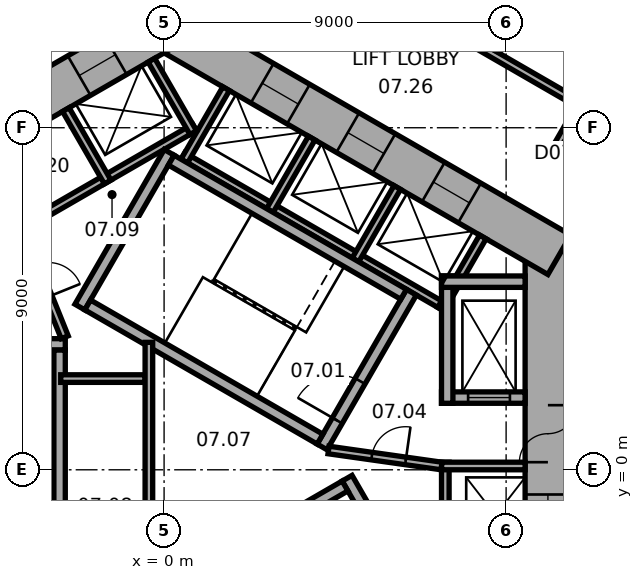
"""IFC4 building model, lengths in metres.
Left out: names, types, materials, properties, quantities, classifications, styles, units other than length and angle.
Written with IfcOpenShell. Run it as: python <this file> out.ifc"""

import sys

from ifc_helpers import new_model, si_unit, direction, frame, frame_2d, origin, place, context, subcontext, project, spatial, rectangle, extrude, element, fill, save


model = new_model("IFC4")
c1 = context("Model", 3, precision=1e-05, world=origin(), true_north=direction((0.0, 1.0)))
c2 = subcontext(c1, "Body", "Model", "MODEL_VIEW")
j1 = project(units=[si_unit("LENGTHUNIT", "METRE"), si_unit("PLANEANGLEUNIT", "RADIAN")], contexts=[c1])
p1 = place(None, origin())
s1 = spatial("IfcSite", under=j1, at=p1, CompositionType="ELEMENT")
p2 = place(p1, origin())
s2 = spatial("IfcBuilding", under=s1, at=p2, CompositionType="ELEMENT")
p3 = place(p2, frame((0.0, 0.0, 44.0)))
s3 = spatial("IfcBuildingStorey", under=s2, at=p3, CompositionType="ELEMENT", Elevation=44.0)
p4 = place(p3, frame((10.1, -6.177, 0.0), z_axis=(0.0, 0.0, 1.0), x_axis=(0.0, 1.0, 0.0)))
e1 = element("IfcWall", 1, at=p4, inside=s3, PredefinedType="SHEAR", context=c2, shape_type="SweptSolid", body=[
    extrude(rectangle(XDim=12.355, YDim=1.2, at=frame_2d((6.177, 0.0))), origin(), (0.0, 0.0, 1.0), 3.3),
])
p5 = place(p4, frame((6.378, 0.0, 0.0)))
e2 = element("IfcOpeningElement", 2, at=p5, cuts=e1, PredefinedType="OPENING", context=c2, shape_type="SweptSolid", body=[
    extrude(rectangle(XDim=1.5, YDim=2.1, at=frame_2d((0.75, 1.05))), frame((0.0, 0.61, 0.0), z_axis=(0.0, -1.0, 0.0), x_axis=(1.0, 0.0, 0.0)), (0.0, 0.0, 1.0), 1.22),
])
p6 = place(p4, frame((1.828, 0.0, 0.0)))
e3 = element("IfcOpeningElement", 3, at=p6, cuts=e1, PredefinedType="OPENING", context=c2, shape_type="SweptSolid", body=[
    extrude(rectangle(XDim=1.1, YDim=2.1, at=frame_2d((0.55, 1.05))), frame((0.0, 0.61, 0.0), z_axis=(0.0, -1.0, 0.0), x_axis=(1.0, 0.0, 0.0)), (0.0, 0.0, 1.0), 1.22),
])
p7 = place(p4, frame((4.427, 0.0, 0.0)))
e4 = element("IfcOpeningElement", 4, at=p7, cuts=e1, PredefinedType="OPENING", context=c2, shape_type="SweptSolid", body=[
    extrude(rectangle(XDim=1.1, YDim=2.1, at=frame_2d((0.55, 1.05))), frame((0.0, 0.61, 0.0), z_axis=(0.0, -1.0, 0.0), x_axis=(1.0, 0.0, 0.0)), (0.0, 0.0, 1.0), 1.22),
])
p8 = place(p3, frame((10.4, 5.658, 0.0), z_axis=(0.0, 0.0, 1.0), x_axis=(-0.866021384402, 0.500006961711, 0.0)))
e5 = element("IfcWall", 5, at=p8, inside=s3, PredefinedType="SHEAR", context=c2, shape_type="SweptSolid", body=[
    extrude(rectangle(XDim=12.355, YDim=1.2, at=frame_2d((6.178, 0.0))), origin(), (0.0, 0.0, 1.0), 3.3),
])
p9 = place(p8, frame((2.728, 0.0, 0.0)))
e6 = element("IfcOpeningElement", 6, at=p9, cuts=e5, PredefinedType="OPENING", context=c2, shape_type="SweptSolid", body=[
    extrude(rectangle(XDim=1.1, YDim=2.1, at=frame_2d((0.55, 1.05))), frame((0.0, 0.61, 0.0), z_axis=(0.0, -1.0, 0.0), x_axis=(1.0, 0.0, 0.0)), (0.0, 0.0, 1.0), 1.22),
])
p10 = place(p8, frame((5.328, 0.0, 0.0)))
e7 = element("IfcOpeningElement", 7, at=p10, cuts=e5, PredefinedType="OPENING", context=c2, shape_type="SweptSolid", body=[
    extrude(rectangle(XDim=1.1, YDim=2.1, at=frame_2d((0.55, 1.05))), frame((0.0, 0.61, 0.0), z_axis=(0.0, -1.0, 0.0), x_axis=(1.0, 0.0, 0.0)), (0.0, 0.0, 1.0), 1.22),
])
p11 = place(p8, frame((7.928, 0.0, 0.0)))
e8 = element("IfcOpeningElement", 8, at=p11, cuts=e5, PredefinedType="OPENING", context=c2, shape_type="SweptSolid", body=[
    extrude(rectangle(XDim=1.1, YDim=2.1, at=frame_2d((0.55, 1.05))), frame((0.0, 0.61, 0.0), z_axis=(0.0, -1.0, 0.0), x_axis=(1.0, 0.0, 0.0)), (0.0, 0.0, 1.0), 1.22),
])
p12 = place(p3, frame((0.3, 11.836, 0.0), z_axis=(0.0, 0.0, 1.0), x_axis=(-0.866021384402, -0.500006961711, 0.0)))
e9 = element("IfcWall", 9, at=p12, inside=s3, PredefinedType="SHEAR", context=c2, shape_type="SweptSolid", body=[
    extrude(rectangle(XDim=12.355, YDim=1.2, at=frame_2d((6.178, 0.0))), origin(), (0.0, 0.0, 1.0), 3.3),
])
p13 = place(p12, frame((6.378, 0.0, 0.0)))
e10 = element("IfcOpeningElement", 10, at=p13, cuts=e9, PredefinedType="OPENING", context=c2, shape_type="SweptSolid", body=[
    extrude(rectangle(XDim=1.5, YDim=2.1, at=frame_2d((0.75, 1.05))), frame((0.0, 0.61, 0.0), z_axis=(0.0, -1.0, 0.0), x_axis=(1.0, 0.0, 0.0)), (0.0, 0.0, 1.0), 1.22),
])
p14 = place(p12, frame((1.828, 0.0, 0.0)))
e11 = element("IfcOpeningElement", 11, at=p14, cuts=e9, PredefinedType="OPENING", context=c2, shape_type="SweptSolid", body=[
    extrude(rectangle(XDim=1.1, YDim=2.1, at=frame_2d((0.55, 1.05))), frame((0.0, 0.61, 0.0), z_axis=(0.0, -1.0, 0.0), x_axis=(1.0, 0.0, 0.0)), (0.0, 0.0, 1.0), 1.22),
])
p15 = place(p3, frame((7.4, -5.2, 0.0), z_axis=(0.0, 0.0, 1.0), x_axis=(0.0, 1.0, 0.0)))
e12 = element("IfcWall", 12, at=p15, inside=s3, PredefinedType="PARTITIONING", context=c2, shape_type="SweptSolid", body=[
    extrude(rectangle(XDim=5.4, YDim=0.2, at=frame_2d((2.7, 0.0))), origin(), (0.0, 0.0, 1.0), 3.05),
])
p16 = place(p3, frame((7.3, 0.1, 0.0), z_axis=(0.0, 0.0, 1.0), x_axis=(1.0, 0.0, 0.0)))
e13 = element("IfcWall", 13, at=p16, inside=s3, PredefinedType="PARTITIONING", context=c2, shape_type="SweptSolid", body=[
    extrude(rectangle(XDim=2.2, YDim=0.2, at=frame_2d((1.1, 0.0))), origin(), (0.0, 0.0, 1.0), 3.05),
])
p17 = place(p3, frame((7.424, 4.259, 0.0), z_axis=(0.0, 0.0, 1.0), x_axis=(-0.866026010844, 0.49999894854, 0.0)))
e14 = element("IfcWall", 14, at=p17, inside=s3, PredefinedType="PARTITIONING", context=c2, shape_type="SweptSolid", body=[
    extrude(rectangle(XDim=8.0, YDim=0.2, at=frame_2d((4.0, 0.0))), origin(), (0.0, 0.0, 1.0), 3.05),
])
for number, where, z_axis, x_axis in (
    (15, (7.287, 4.222, 0.0), (0.0, 0.0, 1.0), (0.5, 0.866, 0.0)),
    (16, (5.036, 5.522, 0.0), (0.0, 0.0, 1.0), (0.5, 0.866, 0.0)),
    (17, (2.784, 6.822, 0.0), (0.0, 0.0, 1.0), (0.5, 0.866, 0.0)),
    (18, (0.532, 8.122, 0.0), (0.0, 0.0, 1.0), (0.5, 0.866, 0.0)),
):
    element("IfcWall", number, at=place(p3, frame(where, z_axis=z_axis, x_axis=x_axis)), inside=s3, PredefinedType="PARTITIONING", context=c2, shape_type="SweptSolid", body=[
        extrude(rectangle(XDim=2.2, YDim=0.2, at=frame_2d((1.1, 0.0))), origin(), (0.0, 0.0, 1.0), 3.05),
    ])
p18 = place(p3, frame((0.803, 9.009, 0.0), z_axis=(0.0, 0.0, 1.0), x_axis=(-0.866028230842, -0.499995103361, 0.0)))
e19 = element("IfcWall", 19, at=p18, inside=s3, PredefinedType="PARTITIONING", context=c2, shape_type="SweptSolid", body=[
    extrude(rectangle(XDim=5.4, YDim=0.2, at=frame_2d((2.7, 0.0))), origin(), (0.0, 0.0, 1.0), 3.05),
])
p19 = place(p3, frame((0.767, 8.872, 0.0), z_axis=(0.0, 0.0, 1.0), x_axis=(-0.499994660107, 0.866028486751, 0.0)))
e20 = element("IfcWall", 20, at=p19, inside=s3, PredefinedType="PARTITIONING", context=c2, shape_type="SweptSolid", body=[
    extrude(rectangle(XDim=2.2, YDim=0.2, at=frame_2d((1.1, 0.0))), origin(), (0.0, 0.0, 1.0), 3.05),
])
p20 = place(p3, frame((-1.485, 7.572, 0.0), z_axis=(0.0, 0.0, 1.0), x_axis=(-0.50002983664, 0.866008176907, 0.0)))
e21 = element("IfcWall", 21, at=p20, inside=s3, PredefinedType="PARTITIONING", context=c2, shape_type="SweptSolid", body=[
    extrude(rectangle(XDim=2.2, YDim=0.2, at=frame_2d((1.1, 0.0))), origin(), (0.0, 0.0, 1.0), 3.05),
])
p21 = place(p3, frame((4.158, 0.602, 0.0), z_axis=(0.0, 0.0, 1.0), x_axis=(0.499977259774, 0.866038532462, 0.0)))
e22 = element("IfcWall", 22, at=p21, inside=s3, PredefinedType="SHEAR", context=c2, shape_type="SweptSolid", body=[
    extrude(rectangle(XDim=4.7, YDim=0.3, at=frame_2d((2.35, 0.0))), origin(), (0.0, 0.0, 1.0), 3.05),
])
p22 = place(p21, frame((0.8, 0.0, 0.0)))
e23 = element("IfcOpeningElement", 23, at=p22, cuts=e22, PredefinedType="OPENING", context=c2, shape_type="SweptSolid", body=[
    extrude(rectangle(XDim=1.2, YDim=2.1, at=frame_2d((0.6, 1.05))), frame((0.0, 0.16, 0.0), z_axis=(0.0, -1.0, 0.0), x_axis=(1.0, 0.0, 0.0)), (0.0, 0.0, 1.0), 0.32),
])
p23 = place(p3, frame((-2.216, 4.282, 0.0), z_axis=(0.0, 0.0, 1.0), x_axis=(0.499977259774, 0.866038532462, 0.0)))
e24 = element("IfcWall", 24, at=p23, inside=s3, PredefinedType="SHEAR", context=c2, shape_type="SweptSolid", body=[
    extrude(rectangle(XDim=4.7, YDim=0.3, at=frame_2d((2.35, 0.0))), origin(), (0.0, 0.0, 1.0), 3.05),
])
for number, where, z_axis, x_axis in (
    (25, (4.103, 0.807, 0.0), (0.0, 0.0, 1.0), (-0.866, 0.5, 0.0)),
    (26, (6.303, 4.617, 0.0), (0.0, 0.0, 1.0), (-0.866, 0.5, 0.0)),
):
    element("IfcWall", number, at=place(p3, frame(where, z_axis=z_axis, x_axis=x_axis)), inside=s3, PredefinedType="SHEAR", context=c2, shape_type="SweptSolid", body=[
        extrude(rectangle(XDim=7.06, YDim=0.3, at=frame_2d((3.53, 0.0))), origin(), (0.0, 0.0, 1.0), 3.05),
    ])
p24 = place(p3, frame((-2.6, 3.3, 0.0), z_axis=(0.0, 0.0, 1.0), x_axis=(-1.0, 0.0, 0.0)))
e27 = element("IfcWall", 27, at=p24, inside=s3, PredefinedType="SHEAR", context=c2, shape_type="SweptSolid", body=[
    extrude(rectangle(XDim=4.7, YDim=0.3, at=frame_2d((2.35, 0.0))), origin(), (0.0, 0.0, 1.0), 3.05),
])
p25 = place(p24, frame((0.8, 0.0, 0.0)))
e28 = element("IfcOpeningElement", 28, at=p25, cuts=e27, PredefinedType="OPENING", context=c2, shape_type="SweptSolid", body=[
    extrude(rectangle(XDim=1.2, YDim=2.1, at=frame_2d((0.6, 1.05))), frame((0.0, 0.16, 0.0), z_axis=(0.0, -1.0, 0.0), x_axis=(1.0, 0.0, 0.0)), (0.0, 0.0, 1.0), 0.32),
])
p26 = place(p3, frame((-2.75, 3.15, 0.0), z_axis=(0.0, 0.0, 1.0), x_axis=(0.0, -1.0, 0.0)))
e29 = element("IfcWall", 29, at=p26, inside=s3, PredefinedType="SHEAR", context=c2, shape_type="SweptSolid", body=[
    extrude(rectangle(XDim=7.06, YDim=0.3, at=frame_2d((3.53, 0.0))), origin(), (0.0, 0.0, 1.0), 3.05),
])
p27 = place(p3, frame((4.816, -0.222, 0.0), z_axis=(0.0, 0.0, 1.0), x_axis=(0.499977259774, -0.866038532462, 0.0)))
e30 = element("IfcWall", 30, at=p27, inside=s3, PredefinedType="SHEAR", context=c2, shape_type="SweptSolid", body=[
    extrude(rectangle(XDim=4.7, YDim=0.3, at=frame_2d((2.35, 0.0))), origin(), (0.0, 0.0, 1.0), 3.05),
])
p28 = place(p3, frame((-1.353, -3.957, 0.0), z_axis=(0.0, 0.0, 1.0), x_axis=(0.866027801685, 0.499995846692, 0.0)))
e31 = element("IfcWall", 31, at=p28, inside=s3, PredefinedType="SHEAR", context=c2, shape_type="SweptSolid", body=[
    extrude(rectangle(XDim=7.06, YDim=0.3, at=frame_2d((3.53, 0.0))), origin(), (0.0, 0.0, 1.0), 3.05),
])
p29 = place(p3, frame((7.3, 1.9, 0.0), z_axis=(0.0, 0.0, 1.0), x_axis=(1.0, 0.0, 0.0)))
e32 = element("IfcWall", 32, at=p29, inside=s3, PredefinedType="SHEAR", context=c2, shape_type="SweptSolid", body=[
    extrude(rectangle(XDim=2.2, YDim=0.3, at=frame_2d((1.1, 0.0))), origin(), (0.0, 0.0, 1.0), 3.05),
])
p30 = place(p29, frame((0.7, 0.0, 0.0)))
e33 = element("IfcOpeningElement", 33, at=p30, cuts=e32, PredefinedType="OPENING", context=c2, shape_type="SweptSolid", body=[
    extrude(rectangle(XDim=1.1, YDim=2.1, at=frame_2d((0.55, 1.05))), frame((0.0, 0.16, 0.0), z_axis=(0.0, -1.0, 0.0), x_axis=(1.0, 0.0, 0.0)), (0.0, 0.0, 1.0), 0.32),
])
p31 = place(p3, frame((7.45, 1.75, 0.0), z_axis=(0.0, 0.0, 1.0), x_axis=(0.0, 1.0, 0.0)))
e34 = element("IfcWall", 34, at=p31, inside=s3, PredefinedType="SHEAR", context=c2, shape_type="SweptSolid", body=[
    extrude(rectangle(XDim=3.35, YDim=0.3, at=frame_2d((1.675, 0.0))), origin(), (0.0, 0.0, 1.0), 3.05),
])
p32 = place(p3, frame((7.3, 4.95, 0.0), z_axis=(0.0, 0.0, 1.0), x_axis=(1.0, 0.0, 0.0)))
e35 = element("IfcWall", 35, at=p32, inside=s3, PredefinedType="SHEAR", context=c2, shape_type="SweptSolid", body=[
    extrude(rectangle(XDim=2.2, YDim=0.3, at=frame_2d((1.1, 0.0))), origin(), (0.0, 0.0, 1.0), 3.05),
])
p33 = place(p3, frame((4.327, 0.521, 0.0), z_axis=(0.0, 0.0, 1.0), x_axis=(0.990124376366, -0.14019172346, 0.0)))
e36 = element("IfcWall", 36, at=p33, inside=s3, PredefinedType="PARTITIONING", context=c2, shape_type="SweptSolid", body=[
    extrude(rectangle(XDim=3.002, YDim=0.2, at=frame_2d((1.501, 0.0))), origin(), (0.0, 0.0, 1.0), 3.05),
])
p34 = place(p33, frame((1.15, 0.0, 0.0)))
e37 = element("IfcOpeningElement", 37, at=p34, cuts=e36, PredefinedType="OPENING", context=c2, shape_type="SweptSolid", body=[
    extrude(rectangle(XDim=0.9, YDim=2.1, at=frame_2d((0.45, 1.05))), frame((0.0, 0.11, 0.0), z_axis=(0.0, -1.0, 0.0), x_axis=(1.0, 0.0, 0.0)), (0.0, 0.0, 1.0), 0.22),
])
p35 = place(p3, frame((-2.615, 3.487, 0.0), z_axis=(0.0, 0.0, 1.0), x_axis=(-0.373576831041, 0.92759924068, 0.0)))
e38 = element("IfcWall", 38, at=p35, inside=s3, PredefinedType="PARTITIONING", context=c2, shape_type="SweptSolid", body=[
    extrude(rectangle(XDim=3.002, YDim=0.2, at=frame_2d((1.501, 0.0))), origin(), (0.0, 0.0, 1.0), 3.05),
])
p36 = place(p35, frame((1.15, 0.0, 0.0)))
e39 = element("IfcOpeningElement", 39, at=p36, cuts=e38, PredefinedType="OPENING", context=c2, shape_type="SweptSolid", body=[
    extrude(rectangle(XDim=0.9, YDim=2.1, at=frame_2d((0.45, 1.05))), frame((0.0, 0.11, 0.0), z_axis=(0.0, -1.0, 0.0), x_axis=(1.0, 0.0, 0.0)), (0.0, 0.0, 1.0), 0.22),
])
p37 = place(p3, frame((-2.72, 2.4, 0.0), z_axis=(0.0, 0.0, 1.0), x_axis=(1.0, 0.0, 0.0)))
e40 = element("IfcWall", 40, at=p37, inside=s3, PredefinedType="PARTITIONING", context=c2, shape_type="SweptSolid", body=[
    extrude(rectangle(XDim=2.22, YDim=0.2, at=frame_2d((1.11, 0.0))), origin(), (0.0, 0.0, 1.0), 3.05),
])
p38 = place(p3, frame((-0.4, -3.353, 0.0), z_axis=(0.0, 0.0, 1.0), x_axis=(0.0, 1.0, 0.0)))
e41 = element("IfcWall", 41, at=p38, inside=s3, PredefinedType="PARTITIONING", context=c2, shape_type="SweptSolid", body=[
    extrude(rectangle(XDim=6.707, YDim=0.2, at=frame_2d((3.353, 0.0))), origin(), (0.0, 0.0, 1.0), 3.05),
])
p39 = place(p3, frame((10.371, 8.561, 0.0), z_axis=(0.0, 0.0, 1.0), x_axis=(0.499986357472, 0.866033280158, 0.0)))
e42 = element("IfcWall", 42, at=p39, inside=s3, PredefinedType="PARTITIONING", context=c2, shape_type="SweptSolid", body=[
    extrude(rectangle(XDim=1.201, YDim=0.2, at=frame_2d((0.601, 0.0))), origin(), (0.0, 0.0, 1.0), 3.05),
])
p40 = place(p3, frame((10.885, 9.652, 0.0), z_axis=(0.0, 0.0, 1.0), x_axis=(-0.866033868542, 0.499985338323, 0.0)))
e43 = element("IfcWall", 43, at=p40, inside=s3, PredefinedType="PARTITIONING", context=c2, shape_type="SweptSolid", body=[
    extrude(rectangle(XDim=8.602, YDim=0.2, at=frame_2d((4.301, 0.0))), origin(), (0.0, 0.0, 1.0), 3.05),
])
p41 = place(p40, frame((5.069, 0.0, 0.0)))
e44 = element("IfcOpeningElement", 44, at=p41, cuts=e43, PredefinedType="OPENING", context=c2, shape_type="SweptSolid", body=[
    extrude(rectangle(XDim=1.0, YDim=2.1, at=frame_2d((0.5, 1.05))), frame((0.0, 0.11, 0.0), z_axis=(0.0, -1.0, 0.0), x_axis=(1.0, 0.0, 0.0)), (0.0, 0.0, 1.0), 0.22),
])
p42 = place(p3, frame((11.566, 7.871, 0.0), z_axis=(0.0, 0.0, 1.0), x_axis=(-0.866004557827, 0.500036104519, 0.0)))
e45 = element("IfcWall", 45, at=p42, inside=s3, PredefinedType="PARTITIONING", context=c2, shape_type="SweptSolid", body=[
    extrude(rectangle(XDim=1.28, YDim=0.2, at=frame_2d((0.64, 0.0))), origin(), (0.0, 0.0, 1.0), 3.05),
])
p43 = place(p42, frame((0.19, 0.0, 0.0)))
e46 = element("IfcOpeningElement", 46, at=p43, cuts=e45, PredefinedType="OPENING", context=c2, shape_type="SweptSolid", body=[
    extrude(rectangle(XDim=0.9, YDim=2.1, at=frame_2d((0.45, 1.05))), frame((0.0, 0.11, 0.0), z_axis=(0.0, -1.0, 0.0), x_axis=(1.0, 0.0, 0.0)), (0.0, 0.0, 1.0), 0.22),
])
p44 = place(p3, frame((12.393, 18.348, 0.0), z_axis=(0.0, 0.0, 1.0), x_axis=(-0.446176022699, -0.894945225569, 0.0)))
e47 = element("IfcWall", 47, at=p44, inside=s3, PredefinedType="PARTITIONING", context=c2, shape_type="SweptSolid", body=[
    extrude(rectangle(XDim=8.191, YDim=0.2, at=frame_2d((4.095, 0.0))), origin(), (0.0, 0.0, 1.0), 2.6),
])
p45 = place(p5, origin())
e48 = element("IfcDoor", 48, at=p45, inside=s3, OperationType="DOUBLE_DOOR_SINGLE_SWING", PredefinedType="DOOR", context=c2, shape_type="SweptSolid", body=[
    extrude(rectangle(XDim=1.5, YDim=2.1, at=frame_2d((0.75, 1.05))), frame((0.0, 0.025, 0.0), z_axis=(0.0, -1.0, 0.0), x_axis=(1.0, 0.0, 0.0)), (0.0, 0.0, 1.0), 0.05),
])
fill(e2, e48)
p46 = place(p22, origin())
e49 = element("IfcDoor", 49, at=p46, inside=s3, OperationType="SINGLE_SWING_RIGHT", PredefinedType="DOOR", context=c2, shape_type="SweptSolid", body=[
    extrude(rectangle(XDim=1.2, YDim=2.1, at=frame_2d((0.6, 1.05))), frame((0.0, 0.025, 0.0), z_axis=(0.0, -1.0, 0.0), x_axis=(1.0, 0.0, 0.0)), (0.0, 0.0, 1.0), 0.05),
])
fill(e23, e49)
p47 = place(p34, origin())
e50 = element("IfcDoor", 50, at=p47, inside=s3, OperationType="SINGLE_SWING_LEFT", PredefinedType="DOOR", context=c2, shape_type="SweptSolid", body=[
    extrude(rectangle(XDim=0.9, YDim=2.1, at=frame_2d((0.45, 1.05))), frame((0.0, 0.025, 0.0), z_axis=(0.0, -1.0, 0.0), x_axis=(1.0, 0.0, 0.0)), (0.0, 0.0, 1.0), 0.05),
])
fill(e37, e50)
p48 = place(p30, origin())
e51 = element("IfcDoor", 51, at=p48, inside=s3, OperationType="DOUBLE_DOOR_SLIDING", PredefinedType="DOOR", context=c2, shape_type="SweptSolid", body=[
    extrude(rectangle(XDim=1.1, YDim=2.1, at=frame_2d((0.55, 1.05))), frame((0.0, 0.025, 0.0), z_axis=(0.0, -1.0, 0.0), x_axis=(1.0, 0.0, 0.0)), (0.0, 0.0, 1.0), 0.05),
])
fill(e33, e51)
p49 = place(p7, origin())
e52 = element("IfcDoor", 52, at=p49, inside=s3, OperationType="DOUBLE_DOOR_SLIDING", PredefinedType="DOOR", context=c2, shape_type="SweptSolid", body=[
    extrude(rectangle(XDim=1.1, YDim=2.1, at=frame_2d((0.55, 1.05))), frame((0.0, 0.025, 0.0), z_axis=(0.0, -1.0, 0.0), x_axis=(1.0, 0.0, 0.0)), (0.0, 0.0, 1.0), 0.05),
])
fill(e4, e52)
p50 = place(p9, origin())
e53 = element("IfcDoor", 53, at=p50, inside=s3, OperationType="DOUBLE_DOOR_SLIDING", PredefinedType="DOOR", context=c2, shape_type="SweptSolid", body=[
    extrude(rectangle(XDim=1.1, YDim=2.1, at=frame_2d((0.55, 1.05))), frame((0.0, 0.025, 0.0), z_axis=(0.0, -1.0, 0.0), x_axis=(1.0, 0.0, 0.0)), (0.0, 0.0, 1.0), 0.05),
])
fill(e6, e53)
p51 = place(p10, origin())
e54 = element("IfcDoor", 54, at=p51, inside=s3, OperationType="DOUBLE_DOOR_SLIDING", PredefinedType="DOOR", context=c2, shape_type="SweptSolid", body=[
    extrude(rectangle(XDim=1.1, YDim=2.1, at=frame_2d((0.55, 1.05))), frame((0.0, 0.025, 0.0), z_axis=(0.0, -1.0, 0.0), x_axis=(1.0, 0.0, 0.0)), (0.0, 0.0, 1.0), 0.05),
])
fill(e7, e54)
p52 = place(p11, origin())
e55 = element("IfcDoor", 55, at=p52, inside=s3, OperationType="DOUBLE_DOOR_SLIDING", PredefinedType="DOOR", context=c2, shape_type="SweptSolid", body=[
    extrude(rectangle(XDim=1.1, YDim=2.1, at=frame_2d((0.55, 1.05))), frame((0.0, 0.025, 0.0), z_axis=(0.0, -1.0, 0.0), x_axis=(1.0, 0.0, 0.0)), (0.0, 0.0, 1.0), 0.05),
])
fill(e8, e55)
p53 = place(p14, origin())
e56 = element("IfcDoor", 56, at=p53, inside=s3, OperationType="DOUBLE_DOOR_SLIDING", PredefinedType="DOOR", context=c2, shape_type="SweptSolid", body=[
    extrude(rectangle(XDim=1.1, YDim=2.1, at=frame_2d((0.55, 1.05))), frame((0.0, 0.025, 0.0), z_axis=(0.0, -1.0, 0.0), x_axis=(1.0, 0.0, 0.0)), (0.0, 0.0, 1.0), 0.05),
])
fill(e11, e56)
save(model, sys.argv[1])
